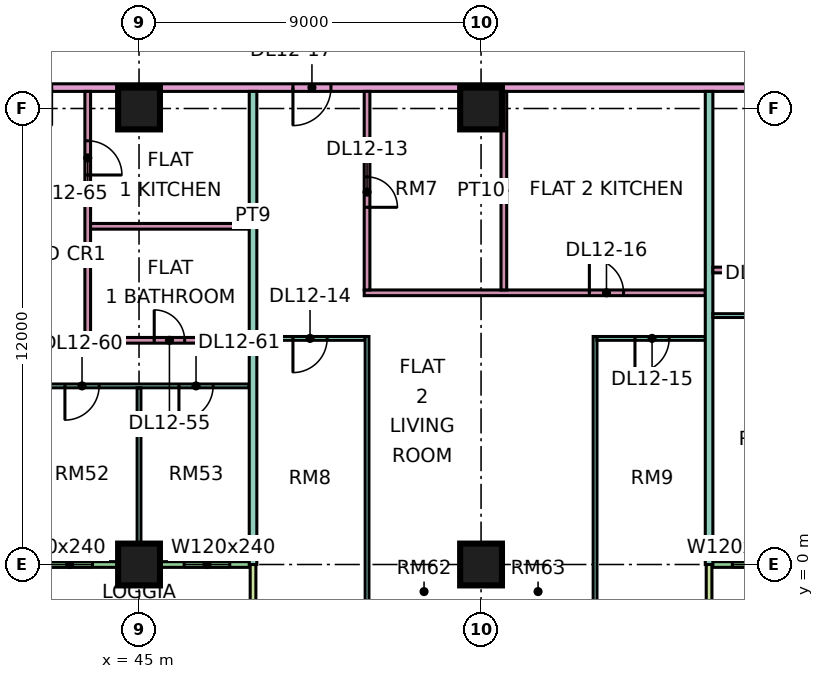
"""IFC4 building model, lengths in metres.
Left out: names, types, materials, properties, quantities, classifications, styles, units other than length and angle.
Written with IfcOpenShell. Run it as: python <this file> out.ifc"""

import sys

from ifc_helpers import new_model, si_unit, direction, frame, frame_2d, origin, origin_2d, place, context, subcontext, project, spatial, rectangle, extrude, element, fill, save


model = new_model("IFC4")
c1 = context("Model", 3, precision=1e-05, world=origin(), true_north=direction((0.0, 1.0)))
c2 = subcontext(c1, "Body", "Model", "MODEL_VIEW")
j1 = project(units=[si_unit("LENGTHUNIT", "METRE"), si_unit("PLANEANGLEUNIT", "RADIAN")], contexts=[c1])
p1 = place(None, origin())
s1 = spatial("IfcSite", under=j1, at=p1, CompositionType="ELEMENT")
p2 = place(p1, origin())
s2 = spatial("IfcBuilding", under=s1, at=p2, CompositionType="ELEMENT")
p3 = place(p2, frame((0.0, 0.0, 60.15)))
s3 = spatial("IfcBuildingStorey", under=s2, at=p3, CompositionType="ELEMENT", Elevation=60.15)
for number, where, z_axis, x_axis in (
    (1, (45.0, 0.0, 0.0), (0.0, 0.0, 1.0), (1.0, 0.0, 0.0)),
    (2, (45.0, 12.0, 0.0), (0.0, 0.0, 1.0), (1.0, 0.0, 0.0)),
    (3, (54.0, 0.0, 0.0), (0.0, 0.0, 1.0), (1.0, 0.0, 0.0)),
    (4, (54.0, 12.0, 0.0), (0.0, 0.0, 1.0), (1.0, 0.0, 0.0)),
):
    element("IfcColumn", number, at=place(p3, frame(where, z_axis=z_axis, x_axis=x_axis)), inside=s3, PredefinedType="COLUMN", context=c2, shape_type="SweptSolid", body=[
        extrude(rectangle(XDim=1.1, YDim=1.1, at=origin_2d()), origin(), (0.0, 0.0, 1.0), 3.75),
    ])
p4 = place(p3, frame((36.075, 0.0, 0.0), z_axis=(0.0, 0.0, 1.0), x_axis=(1.0, 0.0, 0.0)))
e5 = element("IfcWall", 5, at=p4, inside=s3, PredefinedType="SOLIDWALL", context=c2, shape_type="SweptSolid", body=[
    extrude(rectangle(XDim=11.85, YDim=0.15, at=frame_2d((5.925, 0.0))), origin(), (0.0, 0.0, 1.0), 3.35),
])
p5 = place(p4, frame((2.35, 0.0, 0.0)))
e6 = element("IfcOpeningElement", 6, at=p5, cuts=e5, PredefinedType="OPENING", context=c2, shape_type="SweptSolid", body=[
    extrude(rectangle(XDim=1.8, YDim=2.4, at=frame_2d((0.9, 1.2))), frame((0.0, 0.085, 0.0), z_axis=(0.0, -1.0, 0.0), x_axis=(1.0, 0.0, 0.0)), (0.0, 0.0, 1.0), 0.17),
])
p6 = place(p4, frame((6.5, 0.0, 0.45)))
e7 = element("IfcOpeningElement", 7, at=p6, cuts=e5, PredefinedType="OPENING", context=c2, shape_type="SweptSolid", body=[
    extrude(rectangle(XDim=1.2, YDim=2.4, at=frame_2d((0.6, 1.2))), frame((0.0, 0.085, 0.0), z_axis=(0.0, -1.0, 0.0), x_axis=(1.0, 0.0, 0.0)), (0.0, 0.0, 1.0), 0.17),
])
p7 = place(p4, frame((10.113, 0.0, 0.45)))
e8 = element("IfcOpeningElement", 8, at=p7, cuts=e5, PredefinedType="OPENING", context=c2, shape_type="SweptSolid", body=[
    extrude(rectangle(XDim=1.2, YDim=2.4, at=frame_2d((0.6, 1.2))), frame((0.0, 0.085, 0.0), z_axis=(0.0, -1.0, 0.0), x_axis=(1.0, 0.0, 0.0)), (0.0, 0.0, 1.0), 0.17),
])
p8 = place(p3, frame((48.0, -1.5, 0.0), z_axis=(0.0, 0.0, 1.0), x_axis=(0.0, 1.0, 0.0)))
e9 = element("IfcWall", 9, at=p8, inside=s3, PredefinedType="SOLIDWALL", context=c2, shape_type="SweptSolid", body=[
    extrude(rectangle(XDim=1.5, YDim=0.15, at=frame_2d((0.75, 0.0))), origin(), (0.0, 0.0, 1.0), 3.35),
])
p9 = place(p3, frame((60.075, 0.0, 0.0), z_axis=(0.0, 0.0, 1.0), x_axis=(1.0, 0.0, 0.0)))
e10 = element("IfcWall", 10, at=p9, inside=s3, PredefinedType="SOLIDWALL", context=c2, shape_type="SweptSolid", body=[
    extrude(rectangle(XDim=10.35, YDim=0.15, at=frame_2d((5.175, 0.0))), origin(), (0.0, 0.0, 1.0), 3.35),
])
p10 = place(p9, frame((0.538, 0.0, 0.45)))
e11 = element("IfcOpeningElement", 11, at=p10, cuts=e10, PredefinedType="OPENING", context=c2, shape_type="SweptSolid", body=[
    extrude(rectangle(XDim=1.2, YDim=2.4, at=frame_2d((0.6, 1.2))), frame((0.0, 0.085, 0.0), z_axis=(0.0, -1.0, 0.0), x_axis=(1.0, 0.0, 0.0)), (0.0, 0.0, 1.0), 0.17),
])
p11 = place(p9, frame((5.35, 0.0, 0.0)))
e12 = element("IfcOpeningElement", 12, at=p11, cuts=e10, PredefinedType="OPENING", context=c2, shape_type="SweptSolid", body=[
    extrude(rectangle(XDim=1.8, YDim=2.4, at=frame_2d((0.9, 1.2))), frame((0.0, 0.085, 0.0), z_axis=(0.0, -1.0, 0.0), x_axis=(1.0, 0.0, 0.0)), (0.0, 0.0, 1.0), 0.17),
])
p12 = place(p9, frame((9.188, 0.0, 0.45)))
e13 = element("IfcOpeningElement", 13, at=p12, cuts=e10, PredefinedType="OPENING", context=c2, shape_type="SweptSolid", body=[
    extrude(rectangle(XDim=0.9, YDim=2.4, at=frame_2d((0.45, 1.2))), frame((0.0, 0.085, 0.0), z_axis=(0.0, -1.0, 0.0), x_axis=(1.0, 0.0, 0.0)), (0.0, 0.0, 1.0), 0.17),
])
p13 = place(p3, frame((60.0, -1.5, 0.0), z_axis=(0.0, 0.0, 1.0), x_axis=(0.0, 1.0, 0.0)))
e14 = element("IfcWall", 14, at=p13, inside=s3, PredefinedType="SOLIDWALL", context=c2, shape_type="SweptSolid", body=[
    extrude(rectangle(XDim=1.5, YDim=0.15, at=frame_2d((0.75, 0.0))), origin(), (0.0, 0.0, 1.0), 3.35),
])
p14 = place(p3, frame((33.05, 4.7, 0.0), z_axis=(0.0, 0.0, 1.0), x_axis=(1.0, 0.0, 0.0)))
e15 = element("IfcWall", 15, at=p14, inside=s3, PredefinedType="PARTITIONING", context=c2, shape_type="SweptSolid", body=[
    extrude(rectangle(XDim=14.85, YDim=0.1, at=frame_2d((7.425, 0.0))), origin(), (0.0, 0.0, 1.0), 3.35),
])
p15 = place(p14, frame((10.0, 0.0, 0.0)))
e16 = element("IfcOpeningElement", 16, at=p15, cuts=e15, PredefinedType="OPENING", context=c2, shape_type="SweptSolid", body=[
    extrude(rectangle(XDim=0.9, YDim=2.1, at=frame_2d((0.45, 1.05))), frame((0.0, 0.06, 0.0), z_axis=(0.0, -1.0, 0.0), x_axis=(1.0, 0.0, 0.0)), (0.0, 0.0, 1.0), 0.12),
])
p16 = place(p14, frame((13.0, 0.0, 0.0)))
e17 = element("IfcOpeningElement", 17, at=p16, cuts=e15, PredefinedType="OPENING", context=c2, shape_type="SweptSolid", body=[
    extrude(rectangle(XDim=0.9, YDim=2.1, at=frame_2d((0.45, 1.05))), frame((0.0, 0.06, 0.0), z_axis=(0.0, -1.0, 0.0), x_axis=(1.0, 0.0, 0.0)), (0.0, 0.0, 1.0), 0.12),
])
p17 = place(p14, frame((4.0, 0.0, 0.0)))
e18 = element("IfcOpeningElement", 18, at=p17, cuts=e15, PredefinedType="OPENING", context=c2, shape_type="SweptSolid", body=[
    extrude(rectangle(XDim=0.9, YDim=2.1, at=frame_2d((0.45, 1.05))), frame((0.0, 0.06, 0.0), z_axis=(0.0, -1.0, 0.0), x_axis=(1.0, 0.0, 0.0)), (0.0, 0.0, 1.0), 0.12),
])
p18 = place(p3, frame((40.65, 12.55, 0.0), z_axis=(0.0, 0.0, 1.0), x_axis=(1.0, 0.0, 0.0)))
e19 = element("IfcWall", 19, at=p18, inside=s3, PredefinedType="PARTITIONING", context=c2, shape_type="SweptSolid", body=[
    extrude(rectangle(XDim=31.276, YDim=0.2, at=frame_2d((15.638, 0.0))), origin(), (0.0, 0.0, 1.0), 3.35),
])
p19 = place(p18, frame((8.4, 0.0, 0.0)))
e20 = element("IfcOpeningElement", 20, at=p19, cuts=e19, PredefinedType="OPENING", context=c2, shape_type="SweptSolid", body=[
    extrude(rectangle(XDim=1.0, YDim=2.1, at=frame_2d((0.5, 1.05))), frame((0.0, 0.11, 0.0), z_axis=(0.0, -1.0, 0.0), x_axis=(1.0, 0.0, 0.0)), (0.0, 0.0, 1.0), 0.22),
])
p20 = place(p18, frame((29.7, 0.0, 0.0)))
e21 = element("IfcOpeningElement", 21, at=p20, cuts=e19, PredefinedType="OPENING", context=c2, shape_type="SweptSolid", body=[
    extrude(rectangle(XDim=1.0, YDim=2.1, at=frame_2d((0.5, 1.05))), frame((0.0, 0.11, 0.0), z_axis=(0.0, -1.0, 0.0), x_axis=(1.0, 0.0, 0.0)), (0.0, 0.0, 1.0), 0.22),
])
p21 = place(p18, frame((1.05, 0.0, 0.0)))
e22 = element("IfcOpeningElement", 22, at=p21, cuts=e19, PredefinedType="OPENING", context=c2, shape_type="SweptSolid", body=[
    extrude(rectangle(XDim=1.0, YDim=2.1, at=frame_2d((0.5, 1.05))), frame((0.0, 0.11, 0.0), z_axis=(0.0, -1.0, 0.0), x_axis=(1.0, 0.0, 0.0)), (0.0, 0.0, 1.0), 0.22),
])
p22 = place(p3, frame((43.65, 5.825, 0.0), z_axis=(0.0, 0.0, 1.0), x_axis=(0.0, 1.0, 0.0)))
e23 = element("IfcWall", 23, at=p22, inside=s3, PredefinedType="PARTITIONING", context=c2, shape_type="SweptSolid", body=[
    extrude(rectangle(XDim=6.625, YDim=0.15, at=frame_2d((3.312, 0.0))), origin(), (0.0, 0.0, 1.0), 3.35),
])
p23 = place(p22, frame((4.425, 0.0, 0.0)))
e24 = element("IfcOpeningElement", 24, at=p23, cuts=e23, PredefinedType="OPENING", context=c2, shape_type="SweptSolid", body=[
    extrude(rectangle(XDim=0.9, YDim=2.1, at=frame_2d((0.45, 1.05))), frame((0.0, 0.085, 0.0), z_axis=(0.0, -1.0, 0.0), x_axis=(1.0, 0.0, 0.0)), (0.0, 0.0, 1.0), 0.17),
])
p24 = place(p3, frame((43.725, 5.9, 0.0), z_axis=(0.0, 0.0, 1.0), x_axis=(1.0, 0.0, 0.0)))
e25 = element("IfcWall", 25, at=p24, inside=s3, PredefinedType="PARTITIONING", context=c2, shape_type="SweptSolid", body=[
    extrude(rectangle(XDim=4.175, YDim=0.15, at=frame_2d((2.087, 0.0))), origin(), (0.0, 0.0, 1.0), 3.35),
])
p25 = place(p24, frame((1.675, 0.0, 0.0)))
e26 = element("IfcOpeningElement", 26, at=p25, cuts=e25, PredefinedType="OPENING", context=c2, shape_type="SweptSolid", body=[
    extrude(rectangle(XDim=0.8, YDim=2.1, at=frame_2d((0.4, 1.05))), frame((0.0, 0.085, 0.0), z_axis=(0.0, -1.0, 0.0), x_axis=(1.0, 0.0, 0.0)), (0.0, 0.0, 1.0), 0.17),
])
p26 = place(p3, frame((43.725, 8.9, 0.0), z_axis=(0.0, 0.0, 1.0), x_axis=(1.0, 0.0, 0.0)))
e27 = element("IfcWall", 27, at=p26, inside=s3, PredefinedType="PARTITIONING", context=c2, shape_type="SweptSolid", body=[
    extrude(rectangle(XDim=4.175, YDim=0.15, at=frame_2d((2.087, 0.0))), origin(), (0.0, 0.0, 1.0), 3.35),
])
p27 = place(p3, frame((45.0, 0.074, 0.0), z_axis=(0.0, 0.0, 1.0), x_axis=(0.0, 1.0, 0.0)))
e28 = element("IfcWall", 28, at=p27, inside=s3, PredefinedType="PARTITIONING", context=c2, shape_type="SweptSolid", body=[
    extrude(rectangle(XDim=4.576, YDim=0.1, at=frame_2d((2.288, 0.0))), origin(), (0.0, 0.0, 1.0), 3.35),
])
p28 = place(p3, frame((48.0, 0.0, 0.0), z_axis=(0.0, 0.0, 1.0), x_axis=(0.0, 1.0, 0.0)))
e29 = element("IfcWall", 29, at=p28, inside=s3, PredefinedType="PARTITIONING", context=c2, shape_type="SweptSolid", body=[
    extrude(rectangle(XDim=5.975, YDim=0.2, at=frame_2d((2.988, 0.0))), origin(), (0.0, 0.0, 1.0), 3.35),
])
p29 = place(p3, frame((48.0, 5.9, 0.0), z_axis=(0.0, 0.0, 1.0), x_axis=(0.0, 1.0, 0.0)))
e30 = element("IfcWall", 30, at=p29, inside=s3, PredefinedType="PARTITIONING", context=c2, shape_type="SweptSolid", body=[
    extrude(rectangle(XDim=6.55, YDim=0.2, at=frame_2d((3.275, 0.0))), origin(), (0.0, 0.0, 1.0), 3.35),
])
p30 = place(p3, frame((48.1, 5.95, 0.0), z_axis=(0.0, 0.0, 1.0), x_axis=(1.0, 0.0, 0.0)))
e31 = element("IfcWall", 31, at=p30, inside=s3, PredefinedType="PARTITIONING", context=c2, shape_type="SweptSolid", body=[
    extrude(rectangle(XDim=2.85, YDim=0.1, at=frame_2d((1.425, 0.0))), origin(), (0.0, 0.0, 1.0), 3.35),
])
p31 = place(p30, frame((0.95, 0.0, 0.0)))
e32 = element("IfcOpeningElement", 32, at=p31, cuts=e31, PredefinedType="OPENING", context=c2, shape_type="SweptSolid", body=[
    extrude(rectangle(XDim=0.9, YDim=2.1, at=frame_2d((0.45, 1.05))), frame((0.0, 0.06, 0.0), z_axis=(0.0, -1.0, 0.0), x_axis=(1.0, 0.0, 0.0)), (0.0, 0.0, 1.0), 0.12),
])
p32 = place(p3, frame((50.925, 7.15, 0.0), z_axis=(0.0, 0.0, 1.0), x_axis=(1.0, 0.0, 0.0)))
e33 = element("IfcWall", 33, at=p32, inside=s3, PredefinedType="PARTITIONING", context=c2, shape_type="SweptSolid", body=[
    extrude(rectangle(XDim=8.975, YDim=0.15, at=frame_2d((4.487, 0.0))), origin(), (0.0, 0.0, 1.0), 3.35),
])
p33 = place(p32, frame((5.925, 0.0, 0.0)))
e34 = element("IfcOpeningElement", 34, at=p33, cuts=e33, PredefinedType="OPENING", context=c2, shape_type="SweptSolid", body=[
    extrude(rectangle(XDim=0.9, YDim=2.1, at=frame_2d((0.45, 1.05))), frame((0.0, 0.085, 0.0), z_axis=(0.0, -1.0, 0.0), x_axis=(1.0, 0.0, 0.0)), (0.0, 0.0, 1.0), 0.17),
])
p34 = place(p3, frame((51.0, -1.35, 0.0), z_axis=(0.0, 0.0, 1.0), x_axis=(0.0, 1.0, 0.0)))
e35 = element("IfcWall", 35, at=p34, inside=s3, PredefinedType="PARTITIONING", context=c2, shape_type="SweptSolid", body=[
    extrude(rectangle(XDim=7.35, YDim=0.1, at=frame_2d((3.675, 0.0))), origin(), (0.0, 0.0, 1.0), 3.35),
])
p35 = place(p3, frame((51.0, 7.225, 0.0), z_axis=(0.0, 0.0, 1.0), x_axis=(0.0, 1.0, 0.0)))
e36 = element("IfcWall", 36, at=p35, inside=s3, PredefinedType="PARTITIONING", context=c2, shape_type="SweptSolid", body=[
    extrude(rectangle(XDim=5.225, YDim=0.15, at=frame_2d((2.612, 0.0))), origin(), (0.0, 0.0, 1.0), 3.35),
])
p36 = place(p35, frame((2.175, 0.0, 0.0)))
e37 = element("IfcOpeningElement", 37, at=p36, cuts=e36, PredefinedType="OPENING", context=c2, shape_type="SweptSolid", body=[
    extrude(rectangle(XDim=0.8, YDim=2.1, at=frame_2d((0.4, 1.05))), frame((0.0, 0.085, 0.0), z_axis=(0.0, -1.0, 0.0), x_axis=(1.0, 0.0, 0.0)), (0.0, 0.0, 1.0), 0.17),
])
p37 = place(p3, frame((54.6, 7.225, 0.0), z_axis=(0.0, 0.0, 1.0), x_axis=(0.0, 1.0, 0.0)))
e38 = element("IfcWall", 38, at=p37, inside=s3, PredefinedType="PARTITIONING", context=c2, shape_type="SweptSolid", body=[
    extrude(rectangle(XDim=5.225, YDim=0.15, at=frame_2d((2.612, 0.0))), origin(), (0.0, 0.0, 1.0), 3.35),
])
p38 = place(p3, frame((57.0, -1.35, 0.0), z_axis=(0.0, 0.0, 1.0), x_axis=(0.0, 1.0, 0.0)))
e39 = element("IfcWall", 39, at=p38, inside=s3, PredefinedType="PARTITIONING", context=c2, shape_type="SweptSolid", body=[
    extrude(rectangle(XDim=7.35, YDim=0.1, at=frame_2d((3.675, 0.0))), origin(), (0.0, 0.0, 1.0), 3.35),
])
p39 = place(p3, frame((57.05, 5.95, 0.0), z_axis=(0.0, 0.0, 1.0), x_axis=(1.0, 0.0, 0.0)))
e40 = element("IfcWall", 40, at=p39, inside=s3, PredefinedType="PARTITIONING", context=c2, shape_type="SweptSolid", body=[
    extrude(rectangle(XDim=2.85, YDim=0.1, at=frame_2d((1.425, 0.0))), origin(), (0.0, 0.0, 1.0), 3.35),
])
p40 = place(p39, frame((1.0, 0.0, 0.0)))
e41 = element("IfcOpeningElement", 41, at=p40, cuts=e40, PredefinedType="OPENING", context=c2, shape_type="SweptSolid", body=[
    extrude(rectangle(XDim=0.9, YDim=2.1, at=frame_2d((0.45, 1.05))), frame((0.0, 0.06, 0.0), z_axis=(0.0, -1.0, 0.0), x_axis=(1.0, 0.0, 0.0)), (0.0, 0.0, 1.0), 0.12),
])
p41 = place(p3, frame((60.0, 0.0, 0.0), z_axis=(0.0, 0.0, 1.0), x_axis=(0.0, 1.0, 0.0)))
e42 = element("IfcWall", 42, at=p41, inside=s3, PredefinedType="PARTITIONING", context=c2, shape_type="SweptSolid", body=[
    extrude(rectangle(XDim=12.45, YDim=0.2, at=frame_2d((6.225, 0.0))), origin(), (0.0, 0.0, 1.0), 3.35),
])
p42 = place(p3, frame((60.1, 6.55, 0.0), z_axis=(0.0, 0.0, 1.0), x_axis=(1.0, 0.0, 0.0)))
e43 = element("IfcWall", 43, at=p42, inside=s3, PredefinedType="PARTITIONING", context=c2, shape_type="SweptSolid", body=[
    extrude(rectangle(XDim=2.85, YDim=0.1, at=frame_2d((1.425, 0.0))), origin(), (0.0, 0.0, 1.0), 3.35),
])
p43 = place(p42, frame((0.95, 0.0, 0.0)))
e44 = element("IfcOpeningElement", 44, at=p43, cuts=e43, PredefinedType="OPENING", context=c2, shape_type="SweptSolid", body=[
    extrude(rectangle(XDim=0.9, YDim=2.1, at=frame_2d((0.45, 1.05))), frame((0.0, 0.06, 0.0), z_axis=(0.0, -1.0, 0.0), x_axis=(1.0, 0.0, 0.0)), (0.0, 0.0, 1.0), 0.12),
])
p44 = place(p3, frame((60.1, 7.75, 0.0), z_axis=(0.0, 0.0, 1.0), x_axis=(1.0, 0.0, 0.0)))
e45 = element("IfcWall", 45, at=p44, inside=s3, PredefinedType="PARTITIONING", context=c2, shape_type="SweptSolid", body=[
    extrude(rectangle(XDim=9.575, YDim=0.15, at=frame_2d((4.788, 0.0))), origin(), (0.0, 0.0, 1.0), 3.35),
])
p45 = place(p44, frame((7.65, 0.0, 0.0)))
e46 = element("IfcOpeningElement", 46, at=p45, cuts=e45, PredefinedType="OPENING", context=c2, shape_type="SweptSolid", body=[
    extrude(rectangle(XDim=0.8, YDim=2.1, at=frame_2d((0.4, 1.05))), frame((0.0, 0.085, 0.0), z_axis=(0.0, -1.0, 0.0), x_axis=(1.0, 0.0, 0.0)), (0.0, 0.0, 1.0), 0.17),
])
p46 = place(p44, frame((2.75, 0.0, 0.0)))
e47 = element("IfcOpeningElement", 47, at=p46, cuts=e45, PredefinedType="OPENING", context=c2, shape_type="SweptSolid", body=[
    extrude(rectangle(XDim=0.9, YDim=2.1, at=frame_2d((0.45, 1.05))), frame((0.0, 0.085, 0.0), z_axis=(0.0, -1.0, 0.0), x_axis=(1.0, 0.0, 0.0)), (0.0, 0.0, 1.0), 0.17),
])
p47 = place(p6, origin())
e48 = element("IfcWindow", 48, at=p47, inside=s3, PartitioningType="SINGLE_PANEL", PredefinedType="WINDOW", context=c2, shape_type="SweptSolid", body=[
    extrude(rectangle(XDim=1.2, YDim=2.4, at=frame_2d((0.6, 1.2))), frame((0.0, 0.03, 0.0), z_axis=(0.0, -1.0, 0.0), x_axis=(1.0, 0.0, 0.0)), (0.0, 0.0, 1.0), 0.06),
])
fill(e7, e48)
p48 = place(p7, origin())
e49 = element("IfcWindow", 49, at=p48, inside=s3, PartitioningType="SINGLE_PANEL", PredefinedType="WINDOW", context=c2, shape_type="SweptSolid", body=[
    extrude(rectangle(XDim=1.2, YDim=2.4, at=frame_2d((0.6, 1.2))), frame((0.0, 0.03, 0.0), z_axis=(0.0, -1.0, 0.0), x_axis=(1.0, 0.0, 0.0)), (0.0, 0.0, 1.0), 0.06),
])
fill(e8, e49)
p49 = place(p10, origin())
e50 = element("IfcWindow", 50, at=p49, inside=s3, PartitioningType="SINGLE_PANEL", PredefinedType="WINDOW", context=c2, shape_type="SweptSolid", body=[
    extrude(rectangle(XDim=1.2, YDim=2.4, at=frame_2d((0.6, 1.2))), frame((0.0, 0.03, 0.0), z_axis=(0.0, -1.0, 0.0), x_axis=(1.0, 0.0, 0.0)), (0.0, 0.0, 1.0), 0.06),
])
fill(e11, e50)
p50 = place(p36, frame((0.8, 0.0, 0.0), z_axis=(0.0, 0.0, 1.0), x_axis=(-1.0, 0.0, 0.0)))
e51 = element("IfcDoor", 51, at=p50, inside=s3, OperationType="SINGLE_SWING_LEFT", PredefinedType="DOOR", context=c2, shape_type="SweptSolid", body=[
    extrude(rectangle(XDim=0.8, YDim=2.1, at=frame_2d((0.4, 1.05))), frame((0.0, 0.025, 0.0), z_axis=(0.0, -1.0, 0.0), x_axis=(1.0, 0.0, 0.0)), (0.0, 0.0, 1.0), 0.05),
])
fill(e37, e51)
p51 = place(p31, frame((0.9, 0.0, 0.0), z_axis=(0.0, 0.0, 1.0), x_axis=(-1.0, 0.0, 0.0)))
e52 = element("IfcDoor", 52, at=p51, inside=s3, OperationType="SINGLE_SWING_LEFT", PredefinedType="DOOR", context=c2, shape_type="SweptSolid", body=[
    extrude(rectangle(XDim=0.9, YDim=2.1, at=frame_2d((0.45, 1.05))), frame((0.0, 0.025, 0.0), z_axis=(0.0, -1.0, 0.0), x_axis=(1.0, 0.0, 0.0)), (0.0, 0.0, 1.0), 0.05),
])
fill(e32, e52)
p52 = place(p40, frame((0.9, 0.0, 0.0), z_axis=(0.0, 0.0, 1.0), x_axis=(-1.0, 0.0, 0.0)))
e53 = element("IfcDoor", 53, at=p52, inside=s3, OperationType="SINGLE_SWING_LEFT", PredefinedType="DOOR", context=c2, shape_type="SweptSolid", body=[
    extrude(rectangle(XDim=0.9, YDim=2.1, at=frame_2d((0.45, 1.05))), frame((0.0, 0.025, 0.0), z_axis=(0.0, -1.0, 0.0), x_axis=(1.0, 0.0, 0.0)), (0.0, 0.0, 1.0), 0.05),
])
fill(e41, e53)
p53 = place(p33, origin())
e54 = element("IfcDoor", 54, at=p53, inside=s3, OperationType="SINGLE_SWING_LEFT", PredefinedType="DOOR", context=c2, shape_type="SweptSolid", body=[
    extrude(rectangle(XDim=0.9, YDim=2.1, at=frame_2d((0.45, 1.05))), frame((0.0, 0.025, 0.0), z_axis=(0.0, -1.0, 0.0), x_axis=(1.0, 0.0, 0.0)), (0.0, 0.0, 1.0), 0.05),
])
fill(e34, e54)
p54 = place(p19, frame((1.0, 0.0, 0.0), z_axis=(0.0, 0.0, 1.0), x_axis=(-1.0, 0.0, 0.0)))
e55 = element("IfcDoor", 55, at=p54, inside=s3, OperationType="SINGLE_SWING_LEFT", PredefinedType="DOOR", context=c2, shape_type="SweptSolid", body=[
    extrude(rectangle(XDim=1.0, YDim=2.1, at=frame_2d((0.5, 1.05))), frame((0.0, 0.025, 0.0), z_axis=(0.0, -1.0, 0.0), x_axis=(1.0, 0.0, 0.0)), (0.0, 0.0, 1.0), 0.05),
])
fill(e20, e55)
p55 = place(p25, origin())
e56 = element("IfcDoor", 56, at=p55, inside=s3, OperationType="SINGLE_SWING_LEFT", PredefinedType="DOOR", context=c2, shape_type="SweptSolid", body=[
    extrude(rectangle(XDim=0.8, YDim=2.1, at=frame_2d((0.4, 1.05))), frame((0.0, 0.025, 0.0), z_axis=(0.0, -1.0, 0.0), x_axis=(1.0, 0.0, 0.0)), (0.0, 0.0, 1.0), 0.05),
])
fill(e26, e56)
p56 = place(p15, frame((0.9, 0.0, 0.0), z_axis=(0.0, 0.0, 1.0), x_axis=(-1.0, 0.0, 0.0)))
e57 = element("IfcDoor", 57, at=p56, inside=s3, OperationType="SINGLE_SWING_LEFT", PredefinedType="DOOR", context=c2, shape_type="SweptSolid", body=[
    extrude(rectangle(XDim=0.9, YDim=2.1, at=frame_2d((0.45, 1.05))), frame((0.0, 0.025, 0.0), z_axis=(0.0, -1.0, 0.0), x_axis=(1.0, 0.0, 0.0)), (0.0, 0.0, 1.0), 0.05),
])
fill(e16, e57)
p57 = place(p16, frame((0.9, 0.0, 0.0), z_axis=(0.0, 0.0, 1.0), x_axis=(-1.0, 0.0, 0.0)))
e58 = element("IfcDoor", 58, at=p57, inside=s3, OperationType="SINGLE_SWING_LEFT", PredefinedType="DOOR", context=c2, shape_type="SweptSolid", body=[
    extrude(rectangle(XDim=0.9, YDim=2.1, at=frame_2d((0.45, 1.05))), frame((0.0, 0.025, 0.0), z_axis=(0.0, -1.0, 0.0), x_axis=(1.0, 0.0, 0.0)), (0.0, 0.0, 1.0), 0.05),
])
fill(e17, e58)
p58 = place(p23, frame((0.9, 0.0, 0.0), z_axis=(0.0, 0.0, 1.0), x_axis=(-1.0, 0.0, 0.0)))
e59 = element("IfcDoor", 59, at=p58, inside=s3, OperationType="SINGLE_SWING_LEFT", PredefinedType="DOOR", context=c2, shape_type="SweptSolid", body=[
    extrude(rectangle(XDim=0.9, YDim=2.1, at=frame_2d((0.45, 1.05))), frame((0.0, 0.025, 0.0), z_axis=(0.0, -1.0, 0.0), x_axis=(1.0, 0.0, 0.0)), (0.0, 0.0, 1.0), 0.05),
])
fill(e24, e59)
save(model, sys.argv[1])
